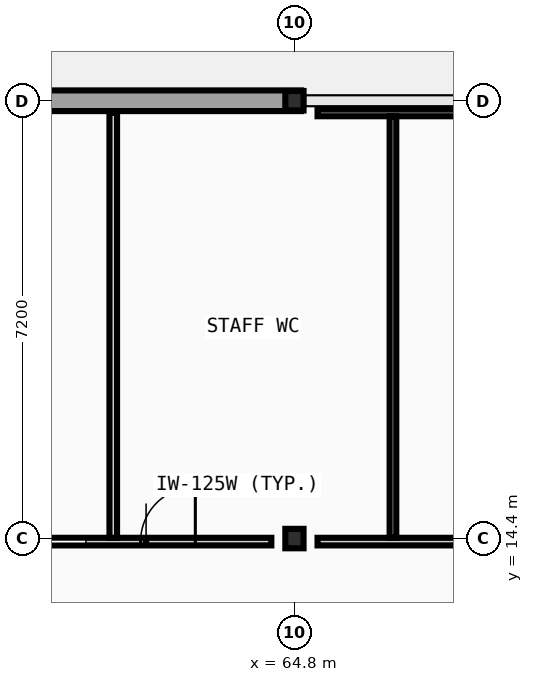
"""IFC4 building model, lengths in metres.
Left out: names, types, materials, properties, quantities, classifications, styles, units other than length and angle.
Written with IfcOpenShell. Run it as: python <this file> out.ifc"""

import sys

from ifc_helpers import new_model, si_unit, direction, frame, frame_2d, origin, origin_2d, place, context, subcontext, project, spatial, rectangle, i_section, extrude, element, fill, save


model = new_model("IFC4")
c1 = context("Model", 3, precision=1e-05, world=origin(), true_north=direction((0.0, 1.0)))
c2 = subcontext(c1, "Body", "Model", "MODEL_VIEW")
j1 = project(units=[si_unit("LENGTHUNIT", "METRE"), si_unit("PLANEANGLEUNIT", "RADIAN")], contexts=[c1])
p1 = place(None, origin())
s1 = spatial("IfcSite", under=j1, at=p1, CompositionType="ELEMENT")
p2 = place(p1, origin())
s2 = spatial("IfcBuilding", under=s1, at=p2, CompositionType="ELEMENT")
p3 = place(p2, frame((0.0, 0.0, 14.0)))
s3 = spatial("IfcBuildingStorey", under=s2, at=p3, CompositionType="ELEMENT", Elevation=14.0)
for number, where, z_axis, x_axis in (
    (1, (64.8, 14.4, 0.0), (0.0, 0.0, 1.0), (1.0, 0.0, 0.0)),
    (2, (64.8, 21.6, 0.0), (0.0, 0.0, 1.0), (1.0, 0.0, 0.0)),
):
    element("IfcColumn", number, at=place(p3, frame(where, z_axis=z_axis, x_axis=x_axis)), inside=s3, PredefinedType="COLUMN", context=c2, shape_type="SweptSolid", body=[
        extrude(i_section(OverallWidth=0.3, OverallDepth=0.32, WebThickness=0.011, FlangeThickness=0.021, FilletRadius=0.027, at=origin_2d()), origin(), (0.0, 0.0, 1.0), 4.4),
    ])
p4 = place(p3, frame((64.91, 21.6, 0.0), z_axis=(0.0, 0.0, 1.0), x_axis=(-1.0, 0.0, 0.0)))
e3 = element("IfcWall", 3, at=p4, inside=s3, PredefinedType="STANDARD", context=c2, shape_type="SweptSolid", body=[
    extrude(rectangle(XDim=6.42, YDim=0.34, at=frame_2d((3.21, 0.0))), origin(), (0.0, 0.0, 1.0), 3.935),
])
p5 = place(p3, frame((58.7, 14.35, 0.0), z_axis=(0.0, 0.0, 1.0), x_axis=(1.0, 0.0, 0.0)))
e4 = element("IfcWall", 4, at=p5, inside=s3, PredefinedType="PARTITIONING", context=c2, shape_type="SweptSolid", body=[
    extrude(rectangle(XDim=5.72, YDim=0.125, at=frame_2d((2.86, 0.0))), origin(), (0.0, 0.0, 1.0), 3.935),
])
p6 = place(p5, frame((1.67, 0.0, 0.0)))
e5 = element("IfcOpeningElement", 5, at=p6, cuts=e4, PredefinedType="OPENING", context=c2, shape_type="SweptSolid", body=[
    extrude(rectangle(XDim=1.0, YDim=2.1, at=frame_2d((0.5, 1.05))), frame((0.0, 0.073, 0.0), z_axis=(0.0, -1.0, 0.0), x_axis=(1.0, 0.0, 0.0)), (0.0, 0.0, 1.0), 0.145),
])
p7 = place(p5, frame((3.57, 0.0, 0.0)))
e6 = element("IfcOpeningElement", 6, at=p7, cuts=e4, PredefinedType="OPENING", context=c2, shape_type="SweptSolid", body=[
    extrude(rectangle(XDim=0.9, YDim=2.1, at=frame_2d((0.45, 1.05))), frame((0.0, 0.073, 0.0), z_axis=(0.0, -1.0, 0.0), x_axis=(1.0, 0.0, 0.0)), (0.0, 0.0, 1.0), 0.145),
])
p8 = place(p3, frame((65.18, 14.35, 0.0), z_axis=(0.0, 0.0, 1.0), x_axis=(1.0, 0.0, 0.0)))
e7 = element("IfcWall", 7, at=p8, inside=s3, PredefinedType="PARTITIONING", context=c2, shape_type="SweptSolid", body=[
    extrude(rectangle(XDim=6.44, YDim=0.125, at=frame_2d((3.22, 0.0))), origin(), (0.0, 0.0, 1.0), 3.935),
])
p9 = place(p8, frame((3.09, 0.0, 0.0)))
e8 = element("IfcOpeningElement", 8, at=p9, cuts=e7, PredefinedType="OPENING", context=c2, shape_type="SweptSolid", body=[
    extrude(rectangle(XDim=1.5, YDim=2.2, at=frame_2d((0.75, 1.1))), frame((0.0, 0.073, 0.0), z_axis=(0.0, -1.0, 0.0), x_axis=(1.0, 0.0, 0.0)), (0.0, 0.0, 1.0), 0.145),
])
p10 = place(p3, frame((65.18, 21.4, 0.0), z_axis=(0.0, 0.0, 1.0), x_axis=(1.0, 0.0, 0.0)))
e9 = element("IfcWall", 9, at=p10, inside=s3, PredefinedType="PARTITIONING", context=c2, shape_type="SweptSolid", body=[
    extrude(rectangle(XDim=6.44, YDim=0.11, at=frame_2d((3.22, 0.0))), origin(), (0.0, 0.0, 1.0), 3.935),
])
p11 = place(p3, frame((61.82, 14.413, 0.0), z_axis=(0.0, 0.0, 1.0), x_axis=(0.0, 1.0, 0.0)))
e10 = element("IfcWall", 10, at=p11, inside=s3, PredefinedType="PARTITIONING", context=c2, shape_type="SweptSolid", body=[
    extrude(rectangle(XDim=6.987, YDim=0.125, at=frame_2d((3.494, 0.0))), origin(), (0.0, 0.0, 1.0), 4.2),
])
p12 = place(p3, frame((66.42, 14.413, 0.0), z_axis=(0.0, 0.0, 1.0), x_axis=(0.0, 1.0, 0.0)))
e11 = element("IfcWall", 11, at=p12, inside=s3, PredefinedType="PARTITIONING", context=c2, shape_type="SweptSolid", body=[
    extrude(rectangle(XDim=6.932, YDim=0.11, at=frame_2d((3.466, 0.0))), origin(), (0.0, 0.0, 1.0), 4.2),
])
p13 = place(p6, frame((1.0, 0.0, 0.0), z_axis=(0.0, 0.0, 1.0), x_axis=(-1.0, 0.0, 0.0)))
e12 = element("IfcDoor", 12, at=p13, inside=s3, OperationType="SLIDING_TO_LEFT", PredefinedType="DOOR", context=c2, shape_type="SweptSolid", body=[
    extrude(rectangle(XDim=1.0, YDim=2.1, at=frame_2d((0.5, 1.05))), frame((0.0, 0.025, 0.0), z_axis=(0.0, -1.0, 0.0), x_axis=(1.0, 0.0, 0.0)), (0.0, 0.0, 1.0), 0.05),
])
fill(e5, e12)
p14 = place(p7, frame((0.9, 0.0, 0.0), z_axis=(0.0, 0.0, 1.0), x_axis=(-1.0, 0.0, 0.0)))
e13 = element("IfcDoor", 13, at=p14, inside=s3, OperationType="SINGLE_SWING_RIGHT", PredefinedType="DOOR", context=c2, shape_type="SweptSolid", body=[
    extrude(rectangle(XDim=0.9, YDim=2.1, at=frame_2d((0.45, 1.05))), frame((0.0, 0.025, 0.0), z_axis=(0.0, -1.0, 0.0), x_axis=(1.0, 0.0, 0.0)), (0.0, 0.0, 1.0), 0.05),
])
fill(e6, e13)
save(model, sys.argv[1])
